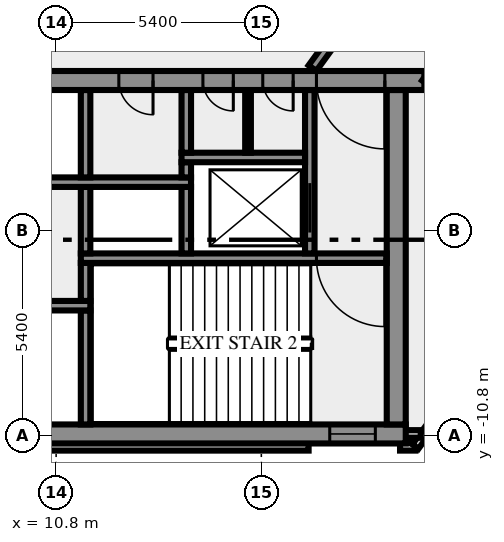
"""IFC4 building model, lengths in metres.
Left out: names, types, materials, properties, quantities, classifications, styles, units other than length and angle.
Written with IfcOpenShell. Run it as: python <this file> out.ifc"""

import sys

from ifc_helpers import new_model, si_unit, direction, frame, frame_2d, origin, place, context, subcontext, project, spatial, rectangle, extrude, element, fill, save


model = new_model("IFC4")
c1 = context("Model", 3, precision=1e-05, world=origin(), true_north=direction((0.0, 1.0)))
c2 = subcontext(c1, "Body", "Model", "MODEL_VIEW")
j1 = project(units=[si_unit("LENGTHUNIT", "METRE"), si_unit("PLANEANGLEUNIT", "RADIAN")], contexts=[c1])
p1 = place(None, origin())
s1 = spatial("IfcSite", under=j1, at=p1, CompositionType="ELEMENT")
p2 = place(p1, origin())
s2 = spatial("IfcBuilding", under=s1, at=p2, CompositionType="ELEMENT")
p3 = place(p2, frame((0.0, 0.0, 129.0)))
s3 = spatial("IfcBuildingStorey", under=s2, at=p3, CompositionType="ELEMENT", Elevation=129.0)
p4 = place(p3, frame((-17.444, -11.088, 0.0), z_axis=(0.0, 0.0, 1.0), x_axis=(1.0, 0.0, 0.0)))
e1 = element("IfcWall", 1, at=p4, inside=s3, PredefinedType="SOLIDWALL", context=c2, shape_type="SweptSolid", body=[
    extrude(rectangle(XDim=34.888, YDim=0.2, at=frame_2d((17.444, 0.0))), origin(), (0.0, 0.0, 1.0), 3.4),
])
p5 = place(p3, frame((19.85, -11.088, 0.0), z_axis=(0.0, 0.0, 1.0), x_axis=(1.0, 0.0, 0.0)))
e2 = element("IfcWall", 2, at=p5, inside=s3, PredefinedType="SOLIDWALL", context=c2, shape_type="SweptSolid", body=[
    extrude(rectangle(XDim=0.406, YDim=0.2, at=frame_2d((0.203, 0.0))), origin(), (0.0, 0.0, 1.0), 3.4),
])
p6 = place(p3, frame((20.253, -11.083, 0.0), z_axis=(0.0, 0.0, 1.0), x_axis=(0.587766567315, 0.809030569476, 0.0)))
e3 = element("IfcWall", 3, at=p6, inside=s3, PredefinedType="SOLIDWALL", context=c2, shape_type="SweptSolid", body=[
    extrude(rectangle(XDim=2.688, YDim=0.2, at=frame_2d((1.344, 0.0))), origin(), (0.0, 0.0, 1.0), 3.4),
])
p7 = place(p3, frame((19.98, -10.75, 0.0), z_axis=(0.0, 0.0, 1.0), x_axis=(1.0, 0.0, 0.0)))
e4 = element("IfcWall", 4, at=p7, inside=s3, PredefinedType="SOLIDWALL", context=c2, shape_type="SweptSolid", body=[
    extrude(rectangle(XDim=0.417, YDim=0.2, at=frame_2d((0.208, 0.0))), origin(), (0.0, 0.0, 1.0), 3.4),
])
p8 = place(p3, frame((-20.0, -10.75, 0.0), z_axis=(0.0, 0.0, 1.0), x_axis=(1.0, 0.0, 0.0)))
e5 = element("IfcWall", 5, at=p8, inside=s3, PredefinedType="SHEAR", context=c2, shape_type="SweptSolid", body=[
    extrude(rectangle(XDim=40.0, YDim=0.5, at=frame_2d((20.0, 0.0))), origin(), (0.0, 0.0, 1.0), 3.4),
])
p9 = place(p8, frame((0.8, 0.0, 1.0)))
e6 = element("IfcOpeningElement", 6, at=p9, cuts=e5, PredefinedType="OPENING", context=c2, shape_type="SweptSolid", body=[
    extrude(rectangle(XDim=1.2, YDim=1.2, at=frame_2d((0.6, 0.6))), frame((0.0, 0.26, 0.0), z_axis=(0.0, -1.0, 0.0), x_axis=(1.0, 0.0, 0.0)), (0.0, 0.0, 1.0), 0.52),
])
p10 = place(p8, frame((38.0, 0.0, 1.0)))
e7 = element("IfcOpeningElement", 7, at=p10, cuts=e5, PredefinedType="OPENING", context=c2, shape_type="SweptSolid", body=[
    extrude(rectangle(XDim=1.2, YDim=1.2, at=frame_2d((0.6, 0.6))), frame((0.0, 0.26, 0.0), z_axis=(0.0, -1.0, 0.0), x_axis=(1.0, 0.0, 0.0)), (0.0, 0.0, 1.0), 0.52),
])
p11 = place(p3, frame((11.575, -10.5, 0.0), z_axis=(0.0, 0.0, 1.0), x_axis=(0.0, 1.0, 0.0)))
e8 = element("IfcWall", 8, at=p11, inside=s3, PredefinedType="SHEAR", context=c2, shape_type="SweptSolid", body=[
    extrude(rectangle(XDim=3.0, YDim=0.25, at=frame_2d((1.5, 0.0))), origin(), (0.0, 0.0, 1.0), 3.4),
])
p12 = place(p3, frame((19.75, -10.5, 0.0), z_axis=(0.0, 0.0, 1.0), x_axis=(0.0, 1.0, 0.0)))
e9 = element("IfcWall", 9, at=p12, inside=s3, PredefinedType="SHEAR", context=c2, shape_type="SweptSolid", body=[
    extrude(rectangle(XDim=8.8, YDim=0.5, at=frame_2d((4.4, 0.0))), origin(), (0.0, 0.0, 1.0), 3.4),
])
p13 = place(p3, frame((11.7, -7.375, 0.0), z_axis=(0.0, 0.0, 1.0), x_axis=(-1.0, 0.0, 0.0)))
e10 = element("IfcWall", 10, at=p13, inside=s3, PredefinedType="SHEAR", context=c2, shape_type="SweptSolid", body=[
    extrude(rectangle(XDim=23.4, YDim=0.25, at=frame_2d((11.7, 0.0))), origin(), (0.0, 0.0, 1.0), 3.4),
])
p14 = place(p13, frame((21.45, 0.0, 0.0)))
e11 = element("IfcOpeningElement", 11, at=p14, cuts=e10, PredefinedType="OPENING", context=c2, shape_type="SweptSolid", body=[
    extrude(rectangle(XDim=1.1, YDim=2.1, at=frame_2d((0.55, 1.05))), frame((0.0, 0.135, 0.0), z_axis=(0.0, -1.0, 0.0), x_axis=(1.0, 0.0, 0.0)), (0.0, 0.0, 1.0), 0.27),
])
p15 = place(p13, frame((18.95, 0.0, 0.0)))
e12 = element("IfcOpeningElement", 12, at=p15, cuts=e10, PredefinedType="OPENING", context=c2, shape_type="SweptSolid", body=[
    extrude(rectangle(XDim=1.1, YDim=2.1, at=frame_2d((0.55, 1.05))), frame((0.0, 0.135, 0.0), z_axis=(0.0, -1.0, 0.0), x_axis=(1.0, 0.0, 0.0)), (0.0, 0.0, 1.0), 0.27),
])
p16 = place(p13, frame((16.45, 0.0, 0.0)))
e13 = element("IfcOpeningElement", 13, at=p16, cuts=e10, PredefinedType="OPENING", context=c2, shape_type="SweptSolid", body=[
    extrude(rectangle(XDim=1.1, YDim=2.1, at=frame_2d((0.55, 1.05))), frame((0.0, 0.135, 0.0), z_axis=(0.0, -1.0, 0.0), x_axis=(1.0, 0.0, 0.0)), (0.0, 0.0, 1.0), 0.27),
])
p17 = place(p13, frame((14.75, 0.0, 0.0)))
e14 = element("IfcOpeningElement", 14, at=p17, cuts=e10, PredefinedType="OPENING", context=c2, shape_type="SweptSolid", body=[
    extrude(rectangle(XDim=0.7, YDim=2.1, at=frame_2d((0.35, 1.05))), frame((0.0, 0.135, 0.0), z_axis=(0.0, -1.0, 0.0), x_axis=(1.0, 0.0, 0.0)), (0.0, 0.0, 1.0), 0.27),
])
p18 = place(p13, frame((13.35, 0.0, 0.0)))
e15 = element("IfcOpeningElement", 15, at=p18, cuts=e10, PredefinedType="OPENING", context=c2, shape_type="SweptSolid", body=[
    extrude(rectangle(XDim=0.9, YDim=2.1, at=frame_2d((0.45, 1.05))), frame((0.0, 0.135, 0.0), z_axis=(0.0, -1.0, 0.0), x_axis=(1.0, 0.0, 0.0)), (0.0, 0.0, 1.0), 0.27),
])
p19 = place(p13, frame((11.975, 0.0, 0.0)))
e16 = element("IfcOpeningElement", 16, at=p19, cuts=e10, PredefinedType="OPENING", context=c2, shape_type="SweptSolid", body=[
    extrude(rectangle(XDim=0.9, YDim=2.1, at=frame_2d((0.45, 1.05))), frame((0.0, 0.135, 0.0), z_axis=(0.0, -1.0, 0.0), x_axis=(1.0, 0.0, 0.0)), (0.0, 0.0, 1.0), 0.27),
])
p20 = place(p13, frame((10.5, 0.0, 0.0)))
e17 = element("IfcOpeningElement", 17, at=p20, cuts=e10, PredefinedType="OPENING", context=c2, shape_type="SweptSolid", body=[
    extrude(rectangle(XDim=0.9, YDim=2.1, at=frame_2d((0.45, 1.05))), frame((0.0, 0.135, 0.0), z_axis=(0.0, -1.0, 0.0), x_axis=(1.0, 0.0, 0.0)), (0.0, 0.0, 1.0), 0.27),
])
p21 = place(p3, frame((11.575, -7.25, 0.0), z_axis=(0.0, 0.0, 1.0), x_axis=(0.0, 1.0, 0.0)))
e18 = element("IfcWall", 18, at=p21, inside=s3, PredefinedType="SHEAR", context=c2, shape_type="SweptSolid", body=[
    extrude(rectangle(XDim=1.0, YDim=0.25, at=frame_2d((0.5, 0.0))), origin(), (0.0, 0.0, 1.0), 3.4),
])
p22 = place(p3, frame((19.5, -6.125, 0.0), z_axis=(0.0, 0.0, 1.0), x_axis=(-1.0, 0.0, 0.0)))
e19 = element("IfcWall", 19, at=p22, inside=s3, PredefinedType="SHEAR", context=c2, shape_type="SweptSolid", body=[
    extrude(rectangle(XDim=8.05, YDim=0.25, at=frame_2d((4.025, 0.0))), origin(), (0.0, 0.0, 1.0), 3.4),
])
p23 = place(p22, frame((0.05, 0.0, 0.0)))
e20 = element("IfcOpeningElement", 20, at=p23, cuts=e19, PredefinedType="OPENING", context=c2, shape_type="SweptSolid", body=[
    extrude(rectangle(XDim=1.8, YDim=2.1, at=frame_2d((0.9, 1.05))), frame((0.0, 0.135, 0.0), z_axis=(0.0, -1.0, 0.0), x_axis=(1.0, 0.0, 0.0)), (0.0, 0.0, 1.0), 0.27),
])
for number, where, z_axis, x_axis in (
    (21, (11.575, -6.0, 0.0), (0.0, 0.0, 1.0), (0.0, 1.0, 0.0)),
    (22, (14.225, -6.0, 0.0), (0.0, 0.0, 1.0), (0.0, 1.0, 0.0)),
):
    element("IfcWall", number, at=place(p3, frame(where, z_axis=z_axis, x_axis=x_axis)), inside=s3, PredefinedType="SHEAR", context=c2, shape_type="SweptSolid", body=[
        extrude(rectangle(XDim=1.75, YDim=0.25, at=frame_2d((0.875, 0.0))), origin(), (0.0, 0.0, 1.0), 3.4),
    ])
p24 = place(p3, frame((17.475, -6.0, 0.0), z_axis=(0.0, 0.0, 1.0), x_axis=(0.0, 1.0, 0.0)))
e23 = element("IfcWall", 23, at=p24, inside=s3, PredefinedType="SHEAR", context=c2, shape_type="SweptSolid", body=[
    extrude(rectangle(XDim=4.3, YDim=0.25, at=frame_2d((2.15, 0.0))), origin(), (0.0, 0.0, 1.0), 3.4),
])
p25 = place(p24, frame((0.55, 0.0, 0.0)))
e24 = element("IfcOpeningElement", 24, at=p25, cuts=e23, PredefinedType="OPENING", context=c2, shape_type="SweptSolid", body=[
    extrude(rectangle(XDim=1.3, YDim=2.1, at=frame_2d((0.65, 1.05))), frame((0.0, 0.135, 0.0), z_axis=(0.0, -1.0, 0.0), x_axis=(1.0, 0.0, 0.0)), (0.0, 0.0, 1.0), 0.27),
])
p26 = place(p3, frame((1.45, -4.125, 0.0), z_axis=(0.0, 0.0, 1.0), x_axis=(1.0, 0.0, 0.0)))
e25 = element("IfcWall", 25, at=p26, inside=s3, PredefinedType="SHEAR", context=c2, shape_type="SweptSolid", body=[
    extrude(rectangle(XDim=12.9, YDim=0.25, at=frame_2d((6.45, 0.0))), origin(), (0.0, 0.0, 1.0), 3.4),
])
p27 = place(p26, frame((0.7, 0.0, 0.0)))
e26 = element("IfcOpeningElement", 26, at=p27, cuts=e25, PredefinedType="OPENING", context=c2, shape_type="SweptSolid", body=[
    extrude(rectangle(XDim=1.3, YDim=2.1, at=frame_2d((0.65, 1.05))), frame((0.0, 0.135, 0.0), z_axis=(0.0, -1.0, 0.0), x_axis=(1.0, 0.0, 0.0)), (0.0, 0.0, 1.0), 0.27),
])
p28 = place(p3, frame((11.575, -4.0, 0.0), z_axis=(0.0, 0.0, 1.0), x_axis=(0.0, 1.0, 0.0)))
e27 = element("IfcWall", 27, at=p28, inside=s3, PredefinedType="SHEAR", context=c2, shape_type="SweptSolid", body=[
    extrude(rectangle(XDim=2.3, YDim=0.25, at=frame_2d((1.15, 0.0))), origin(), (0.0, 0.0, 1.0), 3.4),
])
p29 = place(p3, frame((14.225, -4.0, 0.0), z_axis=(0.0, 0.0, 1.0), x_axis=(0.0, 1.0, 0.0)))
e28 = element("IfcWall", 28, at=p29, inside=s3, PredefinedType="SHEAR", context=c2, shape_type="SweptSolid", body=[
    extrude(rectangle(XDim=0.4, YDim=0.25, at=frame_2d((0.2, 0.0))), origin(), (0.0, 0.0, 1.0), 3.4),
])
p30 = place(p3, frame((14.1, -3.475, 0.0), z_axis=(0.0, 0.0, 1.0), x_axis=(1.0, 0.0, 0.0)))
e29 = element("IfcWall", 29, at=p30, inside=s3, PredefinedType="SHEAR", context=c2, shape_type="SweptSolid", body=[
    extrude(rectangle(XDim=3.25, YDim=0.25, at=frame_2d((1.625, 0.0))), origin(), (0.0, 0.0, 1.0), 3.4),
])
p31 = place(p3, frame((14.225, -3.35, 0.0), z_axis=(0.0, 0.0, 1.0), x_axis=(0.0, 1.0, 0.0)))
e30 = element("IfcWall", 30, at=p31, inside=s3, PredefinedType="SHEAR", context=c2, shape_type="SweptSolid", body=[
    extrude(rectangle(XDim=1.65, YDim=0.25, at=frame_2d((0.825, 0.0))), origin(), (0.0, 0.0, 1.0), 3.4),
])
p32 = place(p3, frame((15.85, -3.35, 0.0), z_axis=(0.0, 0.0, 1.0), x_axis=(0.0, 1.0, 0.0)))
e31 = element("IfcWall", 31, at=p32, inside=s3, PredefinedType="PARTITIONING", context=c2, shape_type="SweptSolid", body=[
    extrude(rectangle(XDim=1.65, YDim=0.15, at=frame_2d((0.825, 0.0))), origin(), (0.0, 0.0, 1.0), 3.4),
])
p33 = place(p3, frame((20.49, -1.45, 0.0), z_axis=(0.0, 0.0, 1.0), x_axis=(-1.0, 0.0, 0.0)))
e32 = element("IfcWall", 32, at=p33, inside=s3, PredefinedType="SHEAR", context=c2, shape_type="SweptSolid", body=[
    extrude(rectangle(XDim=40.98, YDim=0.5, at=frame_2d((20.49, 0.0))), origin(), (0.0, 0.0, 1.0), 3.4),
])
p34 = place(p33, frame((38.14, 0.0, 0.0)))
e33 = element("IfcOpeningElement", 33, at=p34, cuts=e32, PredefinedType="OPENING", context=c2, shape_type="SweptSolid", body=[
    extrude(rectangle(XDim=1.8, YDim=2.1, at=frame_2d((0.9, 1.05))), frame((0.0, 0.26, 0.0), z_axis=(0.0, -1.0, 0.0), x_axis=(1.0, 0.0, 0.0)), (0.0, 0.0, 1.0), 0.52),
])
p35 = place(p33, frame((35.89, 0.0, 0.0)))
e34 = element("IfcOpeningElement", 34, at=p35, cuts=e32, PredefinedType="OPENING", context=c2, shape_type="SweptSolid", body=[
    extrude(rectangle(XDim=0.9, YDim=2.1, at=frame_2d((0.45, 1.05))), frame((0.0, 0.26, 0.0), z_axis=(0.0, -1.0, 0.0), x_axis=(1.0, 0.0, 0.0)), (0.0, 0.0, 1.0), 0.52),
])
p36 = place(p33, frame((32.94, 0.0, 0.0)))
e35 = element("IfcOpeningElement", 35, at=p36, cuts=e32, PredefinedType="OPENING", context=c2, shape_type="SweptSolid", body=[
    extrude(rectangle(XDim=0.9, YDim=2.1, at=frame_2d((0.45, 1.05))), frame((0.0, 0.26, 0.0), z_axis=(0.0, -1.0, 0.0), x_axis=(1.0, 0.0, 0.0)), (0.0, 0.0, 1.0), 0.52),
])
p37 = place(p33, frame((19.59, 0.0, 0.0)))
e36 = element("IfcOpeningElement", 36, at=p37, cuts=e32, PredefinedType="OPENING", context=c2, shape_type="SweptSolid", body=[
    extrude(rectangle(XDim=2.0, YDim=2.1, at=frame_2d((1.0, 1.05))), frame((0.0, 0.26, 0.0), z_axis=(0.0, -1.0, 0.0), x_axis=(1.0, 0.0, 0.0)), (0.0, 0.0, 1.0), 0.52),
])
p38 = place(p33, frame((7.14, 0.0, 0.0)))
e37 = element("IfcOpeningElement", 37, at=p38, cuts=e32, PredefinedType="OPENING", context=c2, shape_type="SweptSolid", body=[
    extrude(rectangle(XDim=0.9, YDim=2.1, at=frame_2d((0.45, 1.05))), frame((0.0, 0.26, 0.0), z_axis=(0.0, -1.0, 0.0), x_axis=(1.0, 0.0, 0.0)), (0.0, 0.0, 1.0), 0.52),
])
p39 = place(p33, frame((5.028, 0.0, 0.0)))
e38 = element("IfcOpeningElement", 38, at=p39, cuts=e32, PredefinedType="OPENING", context=c2, shape_type="SweptSolid", body=[
    extrude(rectangle(XDim=0.8, YDim=2.1, at=frame_2d((0.4, 1.05))), frame((0.0, 0.26, 0.0), z_axis=(0.0, -1.0, 0.0), x_axis=(1.0, 0.0, 0.0)), (0.0, 0.0, 1.0), 0.52),
])
p40 = place(p33, frame((3.452, 0.0, 0.0)))
e39 = element("IfcOpeningElement", 39, at=p40, cuts=e32, PredefinedType="OPENING", context=c2, shape_type="SweptSolid", body=[
    extrude(rectangle(XDim=0.8, YDim=2.1, at=frame_2d((0.4, 1.05))), frame((0.0, 0.26, 0.0), z_axis=(0.0, -1.0, 0.0), x_axis=(1.0, 0.0, 0.0)), (0.0, 0.0, 1.0), 0.52),
])
p41 = place(p33, frame((1.04, 0.0, 0.0)))
e40 = element("IfcOpeningElement", 40, at=p41, cuts=e32, PredefinedType="OPENING", context=c2, shape_type="SweptSolid", body=[
    extrude(rectangle(XDim=1.8, YDim=2.1, at=frame_2d((0.9, 1.05))), frame((0.0, 0.26, 0.0), z_axis=(0.0, -1.0, 0.0), x_axis=(1.0, 0.0, 0.0)), (0.0, 0.0, 1.0), 0.52),
])
p42 = place(p3, frame((17.545, -1.125, 0.0), z_axis=(0.0, 0.0, 1.0), x_axis=(0.587786330937, 0.809016210693, 0.0)))
e41 = element("IfcWall", 41, at=p42, inside=s3, PredefinedType="SOLIDWALL", context=c2, shape_type="SweptSolid", body=[
    extrude(rectangle(XDim=30.103, YDim=0.25, at=frame_2d((15.052, 0.0))), origin(), (0.0, 0.0, 1.0), 3.4),
])
p43 = place(p42, frame((3.441, 0.0, 0.0)))
e42 = element("IfcOpeningElement", 42, at=p43, cuts=e41, PredefinedType="OPENING", context=c2, shape_type="SweptSolid", body=[
    extrude(rectangle(XDim=0.9, YDim=2.1, at=frame_2d((0.45, 1.05))), frame((0.0, 0.135, 0.0), z_axis=(0.0, -1.0, 0.0), x_axis=(1.0, 0.0, 0.0)), (0.0, 0.0, 1.0), 0.27),
])
p44 = place(p42, frame((28.729, 0.0, 0.0)))
e43 = element("IfcOpeningElement", 43, at=p44, cuts=e41, PredefinedType="OPENING", context=c2, shape_type="SweptSolid", body=[
    extrude(rectangle(XDim=0.9, YDim=2.1, at=frame_2d((0.45, 1.05))), frame((0.0, 0.135, 0.0), z_axis=(0.0, -1.0, 0.0), x_axis=(1.0, 0.0, 0.0)), (0.0, 0.0, 1.0), 0.27),
])
p45 = place(p3, frame((37.236, 21.469, 0.0), z_axis=(0.0, 0.0, 1.0), x_axis=(-0.58778344073, -0.809018310549, 0.0)))
e44 = element("IfcWall", 44, at=p45, inside=s3, PredefinedType="SOLIDWALL", context=c2, shape_type="SweptSolid", body=[
    extrude(rectangle(XDim=28.42, YDim=0.25, at=frame_2d((14.21, 0.0))), origin(), (0.0, 0.0, 1.0), 3.4),
])
p46 = place(p45, frame((13.205, 0.0, 0.0)))
e45 = element("IfcOpeningElement", 45, at=p46, cuts=e44, PredefinedType="OPENING", context=c2, shape_type="SweptSolid", body=[
    extrude(rectangle(XDim=1.0, YDim=2.1, at=frame_2d((0.5, 1.05))), frame((0.0, 0.135, 0.0), z_axis=(0.0, -1.0, 0.0), x_axis=(1.0, 0.0, 0.0)), (0.0, 0.0, 1.0), 0.27),
])
p47 = place(p45, frame((0.224, 0.0, 0.0)))
e46 = element("IfcOpeningElement", 46, at=p47, cuts=e44, PredefinedType="OPENING", context=c2, shape_type="SweptSolid", body=[
    extrude(rectangle(XDim=0.9, YDim=2.1, at=frame_2d((0.45, 1.05))), frame((0.0, 0.135, 0.0), z_axis=(0.0, -1.0, 0.0), x_axis=(1.0, 0.0, 0.0)), (0.0, 0.0, 1.0), 0.27),
])
p48 = place(p10, origin())
e47 = element("IfcWindow", 47, at=p48, inside=s3, PartitioningType="SINGLE_PANEL", PredefinedType="WINDOW", context=c2, shape_type="SweptSolid", body=[
    extrude(rectangle(XDim=1.2, YDim=1.2, at=frame_2d((0.6, 0.6))), frame((0.0, 0.03, 0.0), z_axis=(0.0, -1.0, 0.0), x_axis=(1.0, 0.0, 0.0)), (0.0, 0.0, 1.0), 0.06),
])
fill(e7, e47)
p49 = place(p23, origin())
e48 = element("IfcDoor", 48, at=p49, inside=s3, OperationType="DOUBLE_DOOR_SINGLE_SWING", PredefinedType="DOOR", context=c2, shape_type="SweptSolid", body=[
    extrude(rectangle(XDim=1.8, YDim=2.1, at=frame_2d((0.9, 1.05))), frame((0.0, 0.025, 0.0), z_axis=(0.0, -1.0, 0.0), x_axis=(1.0, 0.0, 0.0)), (0.0, 0.0, 1.0), 0.05),
])
fill(e20, e48)
p50 = place(p25, origin())
e49 = element("IfcDoor", 49, at=p50, inside=s3, OperationType="DOUBLE_DOOR_SLIDING", PredefinedType="DOOR", context=c2, shape_type="SweptSolid", body=[
    extrude(rectangle(XDim=1.3, YDim=2.1, at=frame_2d((0.65, 1.05))), frame((0.0, 0.025, 0.0), z_axis=(0.0, -1.0, 0.0), x_axis=(1.0, 0.0, 0.0)), (0.0, 0.0, 1.0), 0.05),
])
fill(e24, e49)
p51 = place(p38, origin())
e50 = element("IfcDoor", 50, at=p51, inside=s3, OperationType="SINGLE_SWING_LEFT", PredefinedType="DOOR", context=c2, shape_type="SweptSolid", body=[
    extrude(rectangle(XDim=0.9, YDim=2.1, at=frame_2d((0.45, 1.05))), frame((0.0, 0.025, 0.0), z_axis=(0.0, -1.0, 0.0), x_axis=(1.0, 0.0, 0.0)), (0.0, 0.0, 1.0), 0.05),
])
fill(e37, e50)
p52 = place(p39, origin())
e51 = element("IfcDoor", 51, at=p52, inside=s3, OperationType="SINGLE_SWING_LEFT", PredefinedType="DOOR", context=c2, shape_type="SweptSolid", body=[
    extrude(rectangle(XDim=0.8, YDim=2.1, at=frame_2d((0.4, 1.05))), frame((0.0, 0.025, 0.0), z_axis=(0.0, -1.0, 0.0), x_axis=(1.0, 0.0, 0.0)), (0.0, 0.0, 1.0), 0.05),
])
fill(e38, e51)
p53 = place(p40, origin())
e52 = element("IfcDoor", 52, at=p53, inside=s3, OperationType="SINGLE_SWING_LEFT", PredefinedType="DOOR", context=c2, shape_type="SweptSolid", body=[
    extrude(rectangle(XDim=0.8, YDim=2.1, at=frame_2d((0.4, 1.05))), frame((0.0, 0.025, 0.0), z_axis=(0.0, -1.0, 0.0), x_axis=(1.0, 0.0, 0.0)), (0.0, 0.0, 1.0), 0.05),
])
fill(e39, e52)
p54 = place(p41, origin())
e53 = element("IfcDoor", 53, at=p54, inside=s3, OperationType="DOUBLE_DOOR_SINGLE_SWING", PredefinedType="DOOR", context=c2, shape_type="SweptSolid", body=[
    extrude(rectangle(XDim=1.8, YDim=2.1, at=frame_2d((0.9, 1.05))), frame((0.0, 0.025, 0.0), z_axis=(0.0, -1.0, 0.0), x_axis=(1.0, 0.0, 0.0)), (0.0, 0.0, 1.0), 0.05),
])
fill(e40, e53)
save(model, sys.argv[1])
